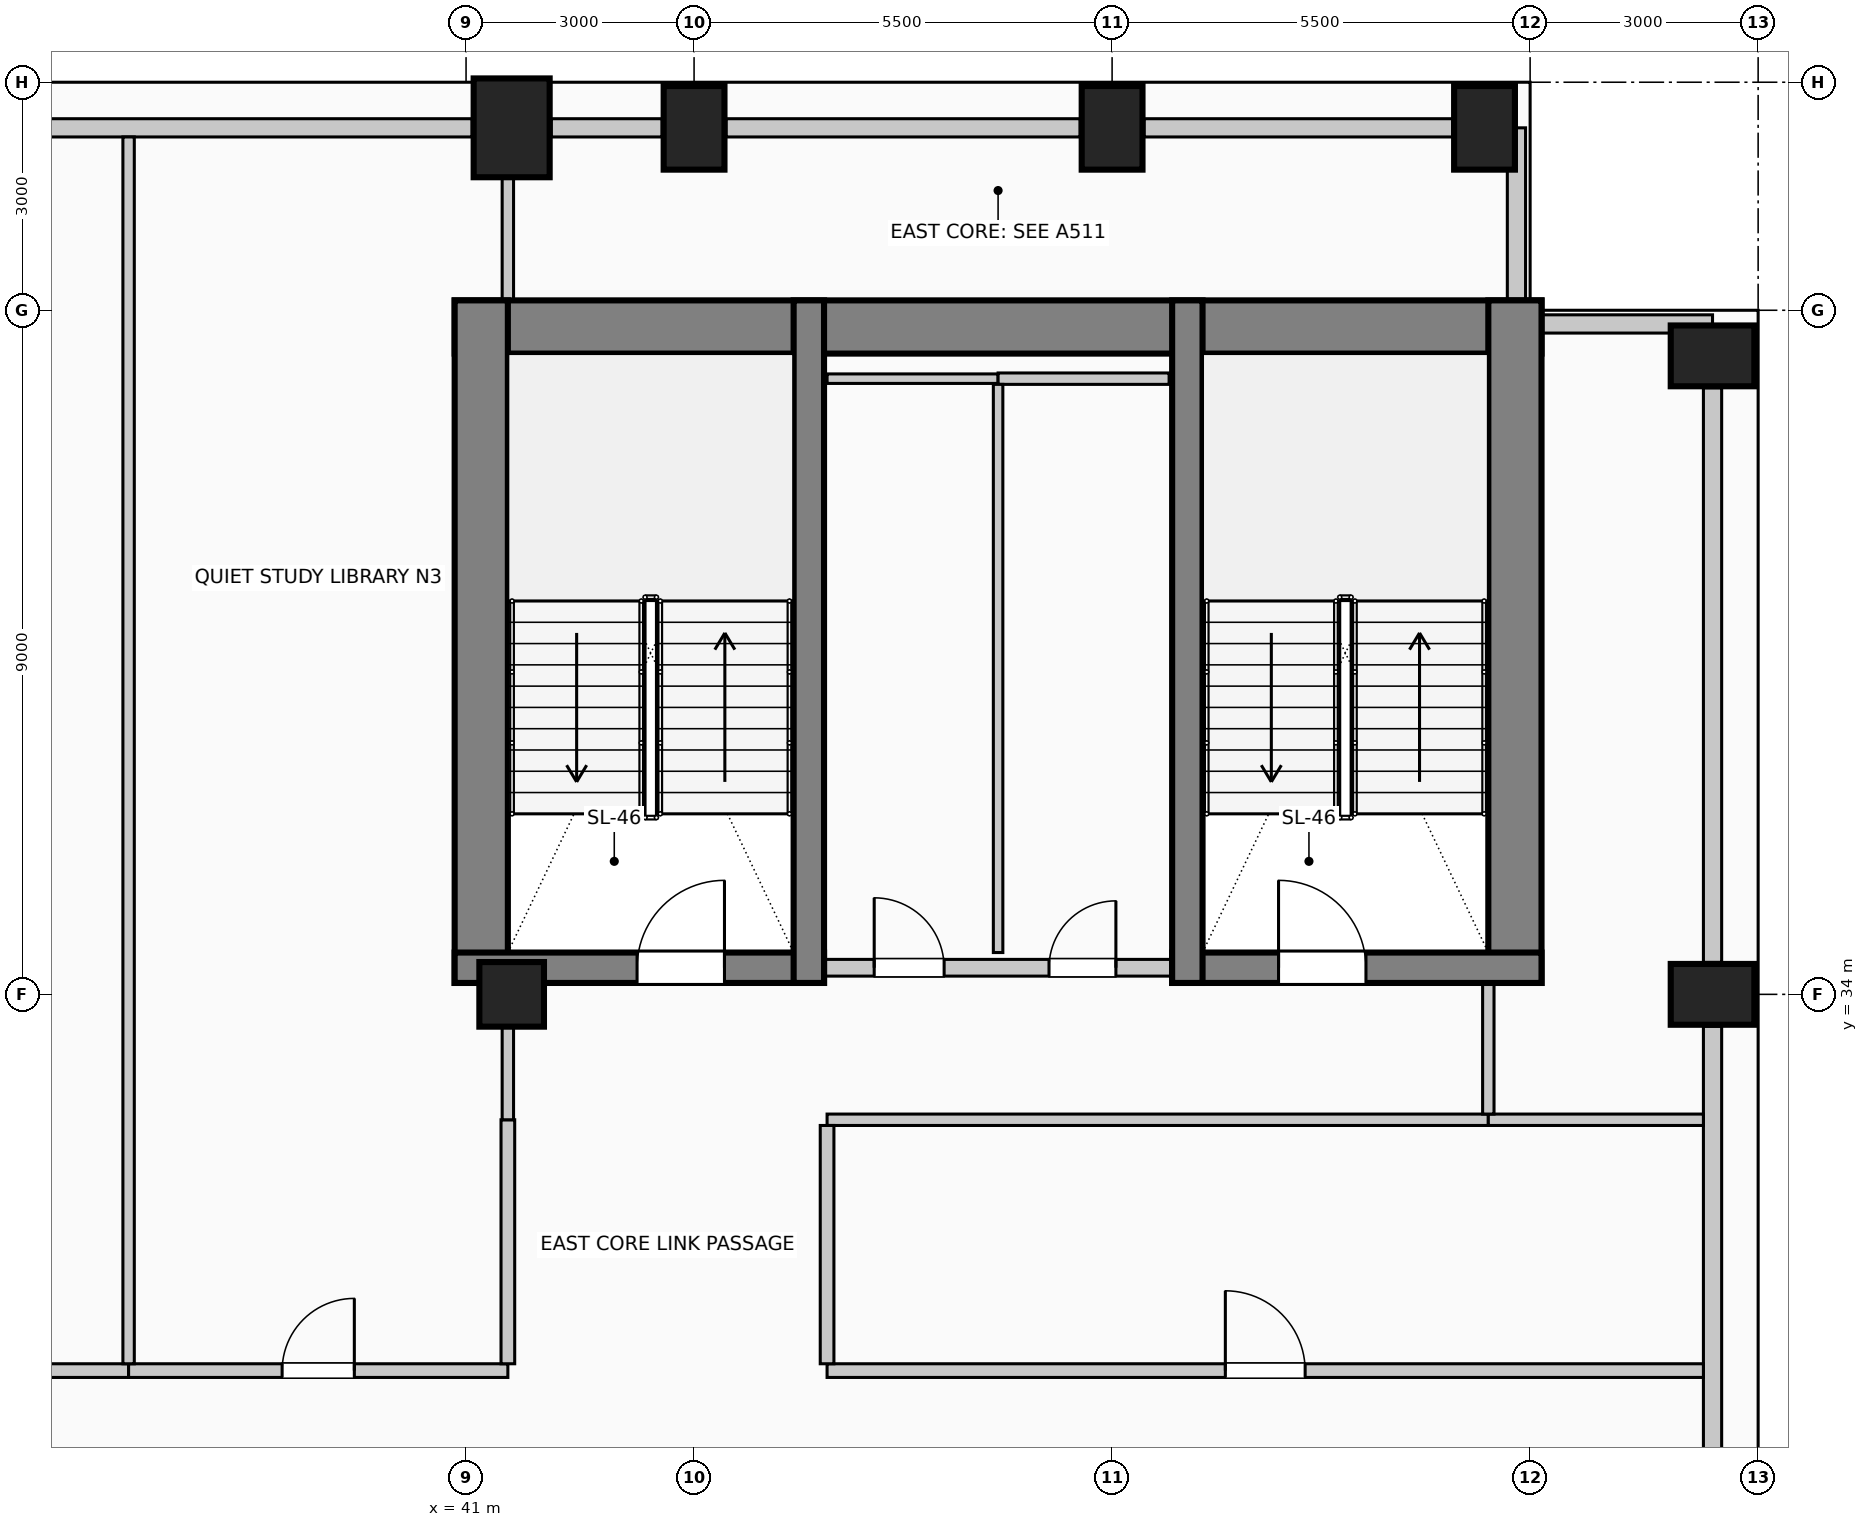
"""IFC4 building model, lengths in metres.
Left out: names, types, materials, properties, quantities, classifications, styles, units other than length and angle.
Written with IfcOpenShell. Run it as: python <this file> out.ifc"""

import sys

from ifc_helpers import new_model, si_unit, direction, frame, frame_2d, origin, origin_2d, place, context, subcontext, project, spatial, rectangle, circle, extrude, element, fill, save


model = new_model("IFC4")
c1 = context("Model", 3, precision=1e-05, world=origin(), true_north=direction((0.0, 1.0)))
c2 = subcontext(c1, "Body", "Model", "MODEL_VIEW")
j1 = project(units=[si_unit("LENGTHUNIT", "METRE"), si_unit("PLANEANGLEUNIT", "RADIAN")], contexts=[c1])
p1 = place(None, origin())
s1 = spatial("IfcSite", under=j1, at=p1, CompositionType="ELEMENT")
p2 = place(p1, origin())
s2 = spatial("IfcBuilding", under=s1, at=p2, CompositionType="ELEMENT")
p3 = place(p2, frame((0.0, 0.0, 214.6)))
s3 = spatial("IfcBuildingStorey", under=s2, at=p3, CompositionType="ELEMENT", Elevation=214.6)
p4 = place(p3, frame((40.85, 42.78, 0.0), z_axis=(0.0, 0.0, 1.0), x_axis=(1.0, 0.0, 0.0)))
e1 = element("IfcWall", 1, at=p4, inside=s3, PredefinedType="SHEAR", context=c2, shape_type="SweptSolid", body=[
    extrude(rectangle(XDim=14.3, YDim=0.7, at=frame_2d((7.15, 0.0))), origin(), (0.0, 0.0, 1.0), 4.0),
])
for number, where, z_axis, x_axis in (
    (2, (41.2, 34.15, 0.0), (0.0, 0.0, 1.0), (0.0, 1.0, 0.0)),
    (3, (54.8, 34.15, 0.0), (0.0, 0.0, 1.0), (0.0, 1.0, 0.0)),
):
    element("IfcWall", number, at=place(p3, frame(where, z_axis=z_axis, x_axis=x_axis)), inside=s3, PredefinedType="SHEAR", context=c2, shape_type="SweptSolid", body=[
        extrude(rectangle(XDim=8.98, YDim=0.7, at=frame_2d((4.49, 0.0))), origin(), (0.0, 0.0, 1.0), 4.0),
    ])
p5 = place(p3, frame((40.85, 34.35, 0.0), z_axis=(0.0, 0.0, 1.0), x_axis=(1.0, 0.0, 0.0)))
e4 = element("IfcWall", 4, at=p5, inside=s3, PredefinedType="SHEAR", context=c2, shape_type="SweptSolid", body=[
    extrude(rectangle(XDim=4.86, YDim=0.4, at=frame_2d((2.43, 0.0))), origin(), (0.0, 0.0, 1.0), 4.0),
])
p6 = place(p5, frame((2.4, 0.0, 0.0)))
e5 = element("IfcOpeningElement", 5, at=p6, cuts=e4, PredefinedType="OPENING", context=c2, shape_type="SweptSolid", body=[
    extrude(rectangle(XDim=1.15, YDim=2.2, at=frame_2d((0.575, 1.1))), frame((0.0, 0.21, 0.0), z_axis=(0.0, -1.0, 0.0), x_axis=(1.0, 0.0, 0.0)), (0.0, 0.0, 1.0), 0.42),
])
p7 = place(p3, frame((45.51, 34.15, 0.0), z_axis=(0.0, 0.0, 1.0), x_axis=(0.0, 1.0, 0.0)))
e6 = element("IfcWall", 6, at=p7, inside=s3, PredefinedType="SHEAR", context=c2, shape_type="SweptSolid", body=[
    extrude(rectangle(XDim=8.98, YDim=0.4, at=frame_2d((4.49, 0.0))), origin(), (0.0, 0.0, 1.0), 4.0),
])
p8 = place(p3, frame((50.29, 34.35, 0.0), z_axis=(0.0, 0.0, 1.0), x_axis=(1.0, 0.0, 0.0)))
e7 = element("IfcWall", 7, at=p8, inside=s3, PredefinedType="SHEAR", context=c2, shape_type="SweptSolid", body=[
    extrude(rectangle(XDim=4.86, YDim=0.4, at=frame_2d((2.43, 0.0))), origin(), (0.0, 0.0, 1.0), 4.0),
])
p9 = place(p8, frame((1.4, 0.0, 0.0)))
e8 = element("IfcOpeningElement", 8, at=p9, cuts=e7, PredefinedType="OPENING", context=c2, shape_type="SweptSolid", body=[
    extrude(rectangle(XDim=1.15, YDim=2.2, at=frame_2d((0.575, 1.1))), frame((0.0, 0.21, 0.0), z_axis=(0.0, -1.0, 0.0), x_axis=(1.0, 0.0, 0.0)), (0.0, 0.0, 1.0), 0.42),
])
p10 = place(p3, frame((50.49, 34.15, 0.0), z_axis=(0.0, 0.0, 1.0), x_axis=(0.0, 1.0, 0.0)))
e9 = element("IfcWall", 9, at=p10, inside=s3, PredefinedType="SHEAR", context=c2, shape_type="SweptSolid", body=[
    extrude(rectangle(XDim=8.98, YDim=0.4, at=frame_2d((4.49, 0.0))), origin(), (0.0, 0.0, 1.0), 4.0),
])
p11 = place(p3, frame((41.6, 45.4, 0.0), z_axis=(0.0, 0.0, 1.0), x_axis=(1.0, 0.0, 0.0)))
e10 = element("IfcColumn", 10, at=p11, inside=s3, PredefinedType="COLUMN", context=c2, shape_type="SweptSolid", body=[
    extrude(rectangle(XDim=1.0, YDim=1.3, at=origin_2d()), origin(), (0.0, 0.0, 1.0), 4.0),
])
for number, where, z_axis, x_axis in (
    (11, (44.0, 45.4, 0.0), (0.0, 0.0, 1.0), (1.0, 0.0, 0.0)),
    (12, (49.5, 45.4, 0.0), (0.0, 0.0, 1.0), (1.0, 0.0, 0.0)),
    (13, (54.4, 45.4, 0.0), (0.0, 0.0, 1.0), (1.0, 0.0, 0.0)),
    (14, (57.4, 34.0, 0.0), (0.0, 0.0, 1.0), (0.0, 1.0, 0.0)),
    (15, (57.4, 42.4, 0.0), (0.0, 0.0, 1.0), (0.0, 1.0, 0.0)),
):
    element("IfcColumn", number, at=place(p3, frame(where, z_axis=z_axis, x_axis=x_axis)), inside=s3, PredefinedType="COLUMN", context=c2, shape_type="SweptSolid", body=[
        extrude(rectangle(XDim=0.8, YDim=1.1, at=origin_2d()), origin(), (0.0, 0.0, 1.0), 4.0),
    ])
p12 = place(p3, frame((41.6, 34.0, 0.0), z_axis=(0.0, 0.0, 1.0), x_axis=(1.0, 0.0, 0.0)))
e16 = element("IfcColumn", 16, at=p12, inside=s3, PredefinedType="COLUMN", context=c2, shape_type="SweptSolid", body=[
    extrude(circle(Radius=0.425, at=origin_2d()), origin(), (0.0, 0.0, 1.0), 4.0),
])
p13 = place(p3, frame((34.52, 45.4, 0.0), z_axis=(0.0, 0.0, 1.0), x_axis=(1.0, 0.0, 0.0)))
e17 = element("IfcWall", 17, at=p13, inside=s3, PredefinedType="SOLIDWALL", context=c2, shape_type="SweptSolid", body=[
    extrude(rectangle(XDim=6.56, YDim=0.24, at=frame_2d((3.28, 0.0))), origin(), (0.0, 0.0, 1.0), 3.0),
])
p14 = place(p3, frame((42.12, 45.4, 0.0), z_axis=(0.0, 0.0, 1.0), x_axis=(1.0, 0.0, 0.0)))
e18 = element("IfcWall", 18, at=p14, inside=s3, PredefinedType="SOLIDWALL", context=c2, shape_type="SweptSolid", body=[
    extrude(rectangle(XDim=1.46, YDim=0.24, at=frame_2d((0.73, 0.0))), origin(), (0.0, 0.0, 1.0), 3.0),
])
p15 = place(p3, frame((44.42, 45.4, 0.0), z_axis=(0.0, 0.0, 1.0), x_axis=(1.0, 0.0, 0.0)))
e19 = element("IfcWall", 19, at=p15, inside=s3, PredefinedType="SOLIDWALL", context=c2, shape_type="SweptSolid", body=[
    extrude(rectangle(XDim=4.66, YDim=0.24, at=frame_2d((2.33, 0.0))), origin(), (0.0, 0.0, 1.0), 3.0),
])
p16 = place(p3, frame((49.92, 45.4, 0.0), z_axis=(0.0, 0.0, 1.0), x_axis=(1.0, 0.0, 0.0)))
e20 = element("IfcWall", 20, at=p16, inside=s3, PredefinedType="SOLIDWALL", context=c2, shape_type="SweptSolid", body=[
    extrude(rectangle(XDim=4.06, YDim=0.24, at=frame_2d((2.03, 0.0))), origin(), (0.0, 0.0, 1.0), 3.0),
])
p17 = place(p3, frame((57.4, 33.58, 0.0), z_axis=(0.0, 0.0, 1.0), x_axis=(0.0, -1.0, 0.0)))
e21 = element("IfcWall", 21, at=p17, inside=s3, PredefinedType="SOLIDWALL", context=c2, shape_type="SweptSolid", body=[
    extrude(rectangle(XDim=7.16, YDim=0.24, at=frame_2d((3.58, 0.0))), origin(), (0.0, 0.0, 1.0), 3.0),
])
p18 = place(p3, frame((57.4, 41.98, 0.0), z_axis=(0.0, 0.0, 1.0), x_axis=(0.0, -1.0, 0.0)))
e22 = element("IfcWall", 22, at=p18, inside=s3, PredefinedType="SOLIDWALL", context=c2, shape_type="SweptSolid", body=[
    extrude(rectangle(XDim=7.56, YDim=0.24, at=frame_2d((3.78, 0.0))), origin(), (0.0, 0.0, 1.0), 3.0),
])
p19 = place(p3, frame((54.82, 45.4, 0.0), z_axis=(0.0, 0.0, 1.0), x_axis=(0.0, -1.0, 0.0)))
e23 = element("IfcWall", 23, at=p19, inside=s3, PredefinedType="SOLIDWALL", context=c2, shape_type="SweptSolid", body=[
    extrude(rectangle(XDim=2.265, YDim=0.24, at=frame_2d((1.132, 0.0))), origin(), (0.0, 0.0, 1.0), 3.75),
])
p20 = place(p3, frame((55.155, 42.82, 0.0), z_axis=(0.0, 0.0, 1.0), x_axis=(1.0, 0.0, 0.0)))
e24 = element("IfcWall", 24, at=p20, inside=s3, PredefinedType="SOLIDWALL", context=c2, shape_type="SweptSolid", body=[
    extrude(rectangle(XDim=2.245, YDim=0.24, at=frame_2d((1.123, 0.0))), origin(), (0.0, 0.0, 1.0), 3.75),
])
p21 = place(p3, frame((45.72, 34.35, 0.0), z_axis=(0.0, 0.0, 1.0), x_axis=(1.0, 0.0, 0.0)))
e25 = element("IfcWall", 25, at=p21, inside=s3, PredefinedType="PARTITIONING", context=c2, shape_type="SweptSolid", body=[
    extrude(rectangle(XDim=4.56, YDim=0.22, at=frame_2d((2.28, 0.0))), origin(), (0.0, 0.0, 1.0), 3.75),
])
p22 = place(p21, frame((0.65, 0.0, 0.0)))
e26 = element("IfcOpeningElement", 26, at=p22, cuts=e25, PredefinedType="OPENING", context=c2, shape_type="SweptSolid", body=[
    extrude(rectangle(XDim=0.92, YDim=2.1, at=frame_2d((0.46, 1.05))), frame((0.0, 0.12, 0.0), z_axis=(0.0, -1.0, 0.0), x_axis=(1.0, 0.0, 0.0)), (0.0, 0.0, 1.0), 0.24),
])
p23 = place(p21, frame((2.95, 0.0, 0.0)))
e27 = element("IfcOpeningElement", 27, at=p23, cuts=e25, PredefinedType="OPENING", context=c2, shape_type="SweptSolid", body=[
    extrude(rectangle(XDim=0.88, YDim=2.1, at=frame_2d((0.44, 1.05))), frame((0.0, 0.12, 0.0), z_axis=(0.0, -1.0, 0.0), x_axis=(1.0, 0.0, 0.0)), (0.0, 0.0, 1.0), 0.24),
])
p24 = place(p3, frame((28.09, 29.05, 0.0), z_axis=(0.0, 0.0, 1.0), x_axis=(1.0, 0.0, 0.0)))
e28 = element("IfcWall", 28, at=p24, inside=s3, PredefinedType="PARTITIONING", context=c2, shape_type="SweptSolid", body=[
    extrude(rectangle(XDim=8.47, YDim=0.18, at=frame_2d((4.235, 0.0))), origin(), (0.0, 0.0, 1.0), 3.75),
])
p25 = place(p24, frame((3.71, 0.0, 0.0)))
e29 = element("IfcOpeningElement", 29, at=p25, cuts=e28, PredefinedType="OPENING", context=c2, shape_type="SweptSolid", body=[
    extrude(rectangle(XDim=1.05, YDim=2.15, at=frame_2d((0.525, 1.075))), frame((0.0, 0.1, 0.0), z_axis=(0.0, -1.0, 0.0), x_axis=(1.0, 0.0, 0.0)), (0.0, 0.0, 1.0), 0.2),
])
p26 = place(p3, frame((36.56, 29.05, 0.0), z_axis=(0.0, 0.0, 1.0), x_axis=(1.0, 0.0, 0.0)))
e30 = element("IfcWall", 30, at=p26, inside=s3, PredefinedType="PARTITIONING", context=c2, shape_type="SweptSolid", body=[
    extrude(rectangle(XDim=4.99, YDim=0.18, at=frame_2d((2.495, 0.0))), origin(), (0.0, 0.0, 1.0), 3.75),
])
p27 = place(p26, frame((2.02, 0.0, 0.0)))
e31 = element("IfcOpeningElement", 31, at=p27, cuts=e30, PredefinedType="OPENING", context=c2, shape_type="SweptSolid", body=[
    extrude(rectangle(XDim=0.95, YDim=2.15, at=frame_2d((0.475, 1.075))), frame((0.0, 0.1, 0.0), z_axis=(0.0, -1.0, 0.0), x_axis=(1.0, 0.0, 0.0)), (0.0, 0.0, 1.0), 0.2),
])
p28 = place(p3, frame((45.75, 29.05, 0.0), z_axis=(0.0, 0.0, 1.0), x_axis=(1.0, 0.0, 0.0)))
e32 = element("IfcWall", 32, at=p28, inside=s3, PredefinedType="PARTITIONING", context=c2, shape_type="SweptSolid", body=[
    extrude(rectangle(XDim=11.53, YDim=0.18, at=frame_2d((5.765, 0.0))), origin(), (0.0, 0.0, 1.0), 3.75),
])
p29 = place(p28, frame((5.24, 0.0, 0.0)))
e33 = element("IfcOpeningElement", 33, at=p29, cuts=e32, PredefinedType="OPENING", context=c2, shape_type="SweptSolid", body=[
    extrude(rectangle(XDim=1.05, YDim=2.15, at=frame_2d((0.525, 1.075))), frame((0.0, 0.1, 0.0), z_axis=(0.0, -1.0, 0.0), x_axis=(1.0, 0.0, 0.0)), (0.0, 0.0, 1.0), 0.2),
])
p30 = place(p3, frame((45.75, 32.35, 0.0), z_axis=(0.0, 0.0, 1.0), x_axis=(1.0, 0.0, 0.0)))
e34 = element("IfcWall", 34, at=p30, inside=s3, PredefinedType="PARTITIONING", context=c2, shape_type="SweptSolid", body=[
    extrude(rectangle(XDim=8.7, YDim=0.15, at=frame_2d((4.35, 0.0))), origin(), (0.0, 0.0, 1.0), 3.75),
])
p31 = place(p3, frame((54.45, 32.35, 0.0), z_axis=(0.0, 0.0, 1.0), x_axis=(1.0, 0.0, 0.0)))
e35 = element("IfcWall", 35, at=p31, inside=s3, PredefinedType="PARTITIONING", context=c2, shape_type="SweptSolid", body=[
    extrude(rectangle(XDim=2.83, YDim=0.15, at=frame_2d((1.415, 0.0))), origin(), (0.0, 0.0, 1.0), 3.75),
])
p32 = place(p3, frame((45.75, 42.1, 0.0), z_axis=(0.0, 0.0, 1.0), x_axis=(1.0, 0.0, 0.0)))
e36 = element("IfcWall", 36, at=p32, inside=s3, PredefinedType="PARTITIONING", context=c2, shape_type="SweptSolid", body=[
    extrude(rectangle(XDim=2.25, YDim=0.125, at=frame_2d((1.125, 0.0))), origin(), (0.0, 0.0, 1.0), 3.75),
])
p33 = place(p3, frame((48.0, 42.1, 0.0), z_axis=(0.0, 0.0, 1.0), x_axis=(1.0, 0.0, 0.0)))
e37 = element("IfcWall", 37, at=p33, inside=s3, PredefinedType="PARTITIONING", context=c2, shape_type="SweptSolid", body=[
    extrude(rectangle(XDim=2.25, YDim=0.15, at=frame_2d((1.125, 0.0))), origin(), (0.0, 0.0, 1.0), 3.75),
])
p34 = place(p3, frame((36.56, 29.14, 0.0), z_axis=(0.0, 0.0, 1.0), x_axis=(0.0, 1.0, 0.0)))
e38 = element("IfcWall", 38, at=p34, inside=s3, PredefinedType="PARTITIONING", context=c2, shape_type="SweptSolid", body=[
    extrude(rectangle(XDim=16.14, YDim=0.15, at=frame_2d((8.07, 0.0))), origin(), (0.0, 0.0, 1.0), 3.75),
])
p35 = place(p3, frame((41.55, 29.14, 0.0), z_axis=(0.0, 0.0, 1.0), x_axis=(0.0, 1.0, 0.0)))
e39 = element("IfcWall", 39, at=p35, inside=s3, PredefinedType="PARTITIONING", context=c2, shape_type="SweptSolid", body=[
    extrude(rectangle(XDim=3.21, YDim=0.18, at=frame_2d((1.605, 0.0))), origin(), (0.0, 0.0, 1.0), 3.145),
])
p36 = place(p3, frame((41.55, 32.35, 0.0), z_axis=(0.0, 0.0, 1.0), x_axis=(0.0, 1.0, 0.0)))
e40 = element("IfcWall", 40, at=p36, inside=s3, PredefinedType="PARTITIONING", context=c2, shape_type="SweptSolid", body=[
    extrude(rectangle(XDim=1.225, YDim=0.15, at=frame_2d((0.612, 0.0))), origin(), (0.0, 0.0, 1.0), 3.145),
])
p37 = place(p3, frame((41.55, 43.13, 0.0), z_axis=(0.0, 0.0, 1.0), x_axis=(0.0, 1.0, 0.0)))
e41 = element("IfcWall", 41, at=p37, inside=s3, PredefinedType="PARTITIONING", context=c2, shape_type="SweptSolid", body=[
    extrude(rectangle(XDim=1.62, YDim=0.15, at=frame_2d((0.81, 0.0))), origin(), (0.0, 0.0, 1.0), 3.75),
])
p38 = place(p3, frame((45.75, 29.14, 0.0), z_axis=(0.0, 0.0, 1.0), x_axis=(0.0, 1.0, 0.0)))
e42 = element("IfcWall", 42, at=p38, inside=s3, PredefinedType="PARTITIONING", context=c2, shape_type="SweptSolid", body=[
    extrude(rectangle(XDim=3.135, YDim=0.18, at=frame_2d((1.567, 0.0))), origin(), (0.0, 0.0, 1.0), 3.75),
])
p39 = place(p3, frame((48.0, 34.55, 0.0), z_axis=(0.0, 0.0, 1.0), x_axis=(0.0, 1.0, 0.0)))
e43 = element("IfcWall", 43, at=p39, inside=s3, PredefinedType="PARTITIONING", context=c2, shape_type="SweptSolid", body=[
    extrude(rectangle(XDim=7.475, YDim=0.125, at=frame_2d((3.737, 0.0))), origin(), (0.0, 0.0, 1.0), 3.75),
])
p40 = place(p3, frame((54.45, 32.425, 0.0), z_axis=(0.0, 0.0, 1.0), x_axis=(0.0, 1.0, 0.0)))
e44 = element("IfcWall", 44, at=p40, inside=s3, PredefinedType="PARTITIONING", context=c2, shape_type="SweptSolid", body=[
    extrude(rectangle(XDim=1.725, YDim=0.15, at=frame_2d((0.862, 0.0))), origin(), (0.0, 0.0, 1.0), 3.75),
])
p41 = place(p6, origin())
e45 = element("IfcDoor", 45, at=p41, inside=s3, OperationType="SINGLE_SWING_RIGHT", PredefinedType="DOOR", context=c2, shape_type="SweptSolid", body=[
    extrude(rectangle(XDim=1.15, YDim=2.2, at=frame_2d((0.575, 1.1))), frame((0.0, 0.025, 0.0), z_axis=(0.0, -1.0, 0.0), x_axis=(1.0, 0.0, 0.0)), (0.0, 0.0, 1.0), 0.05),
])
fill(e5, e45)
p42 = place(p22, origin())
e46 = element("IfcDoor", 46, at=p42, inside=s3, OperationType="SINGLE_SWING_LEFT", PredefinedType="DOOR", context=c2, shape_type="SweptSolid", body=[
    extrude(rectangle(XDim=0.92, YDim=2.1, at=frame_2d((0.46, 1.05))), frame((0.0, 0.025, 0.0), z_axis=(0.0, -1.0, 0.0), x_axis=(1.0, 0.0, 0.0)), (0.0, 0.0, 1.0), 0.05),
])
fill(e26, e46)
p43 = place(p23, origin())
e47 = element("IfcDoor", 47, at=p43, inside=s3, OperationType="SINGLE_SWING_RIGHT", PredefinedType="DOOR", context=c2, shape_type="SweptSolid", body=[
    extrude(rectangle(XDim=0.88, YDim=2.1, at=frame_2d((0.44, 1.05))), frame((0.0, 0.025, 0.0), z_axis=(0.0, -1.0, 0.0), x_axis=(1.0, 0.0, 0.0)), (0.0, 0.0, 1.0), 0.05),
])
fill(e27, e47)
p44 = place(p9, origin())
e48 = element("IfcDoor", 48, at=p44, inside=s3, OperationType="SINGLE_SWING_LEFT", PredefinedType="DOOR", context=c2, shape_type="SweptSolid", body=[
    extrude(rectangle(XDim=1.15, YDim=2.2, at=frame_2d((0.575, 1.1))), frame((0.0, 0.025, 0.0), z_axis=(0.0, -1.0, 0.0), x_axis=(1.0, 0.0, 0.0)), (0.0, 0.0, 1.0), 0.05),
])
fill(e8, e48)
p45 = place(p27, origin())
e49 = element("IfcDoor", 49, at=p45, inside=s3, OperationType="SINGLE_SWING_RIGHT", PredefinedType="DOOR", context=c2, shape_type="SweptSolid", body=[
    extrude(rectangle(XDim=0.95, YDim=2.15, at=frame_2d((0.475, 1.075))), frame((0.0, 0.025, 0.0), z_axis=(0.0, -1.0, 0.0), x_axis=(1.0, 0.0, 0.0)), (0.0, 0.0, 1.0), 0.05),
])
fill(e31, e49)
p46 = place(p29, origin())
e50 = element("IfcDoor", 50, at=p46, inside=s3, OperationType="SINGLE_SWING_LEFT", PredefinedType="DOOR", context=c2, shape_type="SweptSolid", body=[
    extrude(rectangle(XDim=1.05, YDim=2.15, at=frame_2d((0.525, 1.075))), frame((0.0, 0.025, 0.0), z_axis=(0.0, -1.0, 0.0), x_axis=(1.0, 0.0, 0.0)), (0.0, 0.0, 1.0), 0.05),
])
fill(e33, e50)
save(model, sys.argv[1])
